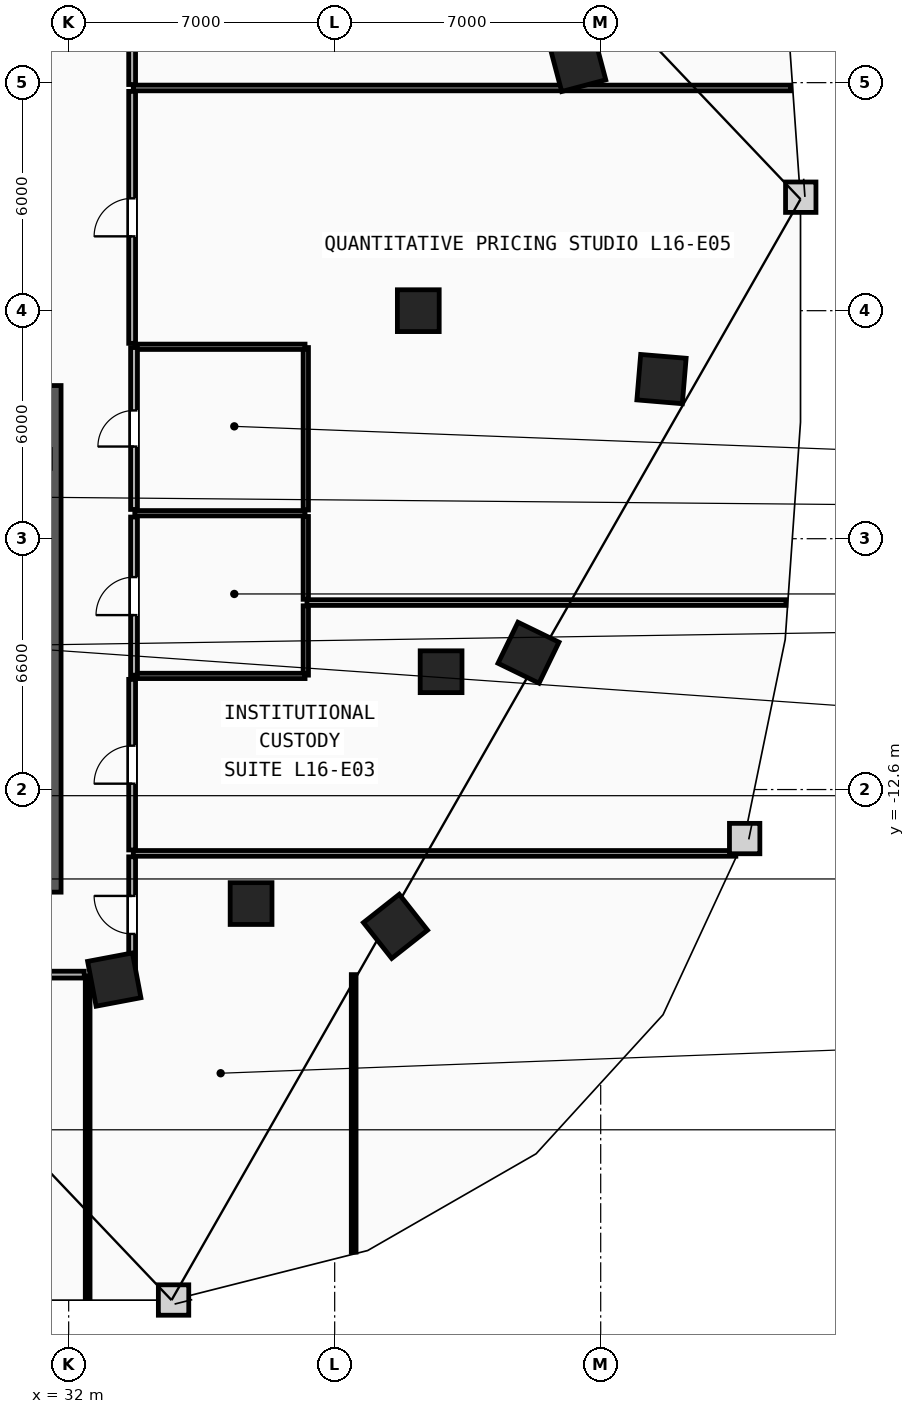
"""IFC4 building model, lengths in metres.
Left out: names, types, materials, properties, quantities, classifications, styles, units other than length and angle.
Written with IfcOpenShell. Run it as: python <this file> out.ifc"""

import sys

from ifc_helpers import new_model, si_unit, direction, frame, frame_2d, origin, origin_2d, place, context, subcontext, project, spatial, rectangle, extrude, element, fill, save


model = new_model("IFC4")
c1 = context("Model", 3, precision=1e-05, world=origin(), true_north=direction((0.0, 1.0)))
c2 = subcontext(c1, "Body", "Model", "MODEL_VIEW")
j1 = project(units=[si_unit("LENGTHUNIT", "METRE"), si_unit("PLANEANGLEUNIT", "RADIAN")], contexts=[c1])
p1 = place(None, origin())
s1 = spatial("IfcSite", under=j1, at=p1, CompositionType="ELEMENT")
p2 = place(p1, origin())
s2 = spatial("IfcBuilding", under=s1, at=p2, CompositionType="ELEMENT")
p3 = place(p2, frame((0.0, 0.0, 65.8)))
s3 = spatial("IfcBuildingStorey", under=s2, at=p3, CompositionType="ELEMENT", Elevation=65.8)
for number, where, z_axis, x_axis in (
    (1, (41.2, 0.0, 0.0), (0.0, 0.0, 1.0), (1.0, 0.0, 0.0)),
    (2, (41.8, -9.5, 0.0), (0.0, 0.0, 1.0), (1.0, 0.0, 0.0)),
    (3, (36.8, -15.6, 0.0), (0.0, 0.0, 1.0), (1.0, 0.0, 0.0)),
):
    element("IfcColumn", number, at=place(p3, frame(where, z_axis=z_axis, x_axis=x_axis)), inside=s3, PredefinedType="COLUMN", context=c2, shape_type="SweptSolid", body=[
        extrude(rectangle(XDim=1.1, YDim=1.1, at=origin_2d()), origin(), (0.0, 0.0, 1.0), 3.8),
    ])
for number, where, z_axis, x_axis in (
    (4, (33.2, -17.6, 0.0), (0.0, 0.0, 1.0), (0.983, 0.186, 0.0)),
    (5, (40.6, -16.2, 0.0), (0.0, 0.0, 1.0), (0.785, 0.619, 0.0)),
    (6, (44.1, -9.0, 0.0), (0.0, 0.0, 1.0), (0.437, 0.899, 0.0)),
    (7, (47.6, -1.8, 0.0), (0.0, 0.0, 1.0), (0.084, 0.997, 0.0)),
    (8, (45.4, 6.5, 0.0), (0.0, 0.0, 1.0), (-0.256, 0.967, 0.0)),
):
    element("IfcColumn", number, at=place(p3, frame(where, z_axis=z_axis, x_axis=x_axis)), inside=s3, PredefinedType="COLUMN", context=c2, shape_type="SweptSolid", body=[
        extrude(rectangle(XDim=1.2, YDim=1.2, at=origin_2d()), origin(), (0.0, 0.0, 1.0), 3.8),
    ])
p4 = place(p3, frame((31.35, -15.3, 0.0), z_axis=(0.0, 0.0, 1.0), x_axis=(0.0, 1.0, 0.0)))
e9 = element("IfcWall", 9, at=p4, inside=s3, PredefinedType="SHEAR", context=c2, shape_type="SweptSolid", body=[
    extrude(rectangle(XDim=13.33, YDim=0.9, at=frame_2d((6.665, 0.0))), origin(), (0.0, 0.0, 1.0), 3.5),
])
p5 = place(p3, frame((38.24, -9.59, 0.0), z_axis=(0.0, 0.0, 1.0), x_axis=(0.0, 1.0, 0.0)))
e10 = element("IfcWall", 10, at=p5, inside=s3, PredefinedType="PARTITIONING", context=c2, shape_type="SweptSolid", body=[
    extrude(rectangle(XDim=1.825, YDim=0.14, at=frame_2d((0.913, 0.0))), origin(), (0.0, 0.0, 1.0), 3.5),
])
p6 = place(p3, frame((38.24, -7.595, 0.0), z_axis=(0.0, 0.0, 1.0), x_axis=(0.0, 1.0, 0.0)))
e11 = element("IfcWall", 11, at=p6, inside=s3, PredefinedType="PARTITIONING", context=c2, shape_type="SweptSolid", body=[
    extrude(rectangle(XDim=2.18, YDim=0.14, at=frame_2d((1.09, 0.0))), origin(), (0.0, 0.0, 1.0), 3.5),
])
p7 = place(p3, frame((38.24, -5.245, 0.0), z_axis=(0.0, 0.0, 1.0), x_axis=(0.0, 1.0, 0.0)))
e12 = element("IfcWall", 12, at=p7, inside=s3, PredefinedType="PARTITIONING", context=c2, shape_type="SweptSolid", body=[
    extrude(rectangle(XDim=4.275, YDim=0.14, at=frame_2d((2.138, 0.0))), origin(), (0.0, 0.0, 1.0), 3.5),
])
for number, where, z_axis, x_axis in (
    (13, (33.74, -0.95, 0.0), (0.0, 0.0, 1.0), (1.0, 0.0, 0.0)),
    (14, (33.74, -5.33, 0.0), (0.0, 0.0, 1.0), (1.0, 0.0, 0.0)),
    (15, (33.74, -9.61, 0.0), (0.0, 0.0, 1.0), (1.0, 0.0, 0.0)),
):
    element("IfcWall", number, at=place(p3, frame(where, z_axis=z_axis, x_axis=x_axis)), inside=s3, PredefinedType="PARTITIONING", context=c2, shape_type="SweptSolid", body=[
        extrude(rectangle(XDim=4.48, YDim=0.14, at=frame_2d((2.24, 0.0))), origin(), (0.0, 0.0, 1.0), 3.5),
    ])
p8 = place(p3, frame((33.72, -5.23, 0.0), z_axis=(0.0, 0.0, 1.0), x_axis=(0.0, 1.0, 0.0)))
e16 = element("IfcWall", 16, at=p8, inside=s3, PredefinedType="PARTITIONING", context=c2, shape_type="SweptSolid", body=[
    extrude(rectangle(XDim=4.26, YDim=0.18, at=frame_2d((2.13, 0.0))), origin(), (0.0, 0.0, 1.0), 3.5),
])
p9 = place(p8, frame((1.655, 0.0, 0.0)))
e17 = element("IfcOpeningElement", 17, at=p9, cuts=e16, PredefinedType="OPENING", context=c2, shape_type="SweptSolid", body=[
    extrude(rectangle(XDim=0.95, YDim=2.1, at=frame_2d((0.475, 1.05))), frame((0.0, 0.1, 0.0), z_axis=(0.0, -1.0, 0.0), x_axis=(1.0, 0.0, 0.0)), (0.0, 0.0, 1.0), 0.2),
])
p10 = place(p3, frame((33.72, -9.59, 0.0), z_axis=(0.0, 0.0, 1.0), x_axis=(0.0, 1.0, 0.0)))
e18 = element("IfcWall", 18, at=p10, inside=s3, PredefinedType="PARTITIONING", context=c2, shape_type="SweptSolid", body=[
    extrude(rectangle(XDim=4.16, YDim=0.18, at=frame_2d((2.08, 0.0))), origin(), (0.0, 0.0, 1.0), 3.5),
])
p11 = place(p10, frame((1.58, 0.0, 0.0)))
e19 = element("IfcOpeningElement", 19, at=p11, cuts=e18, PredefinedType="OPENING", context=c2, shape_type="SweptSolid", body=[
    extrude(rectangle(XDim=1.0, YDim=2.15, at=frame_2d((0.5, 1.075))), frame((0.0, 0.1, 0.0), z_axis=(0.0, -1.0, 0.0), x_axis=(1.0, 0.0, 0.0)), (0.0, 0.0, 1.0), 0.2),
])
p12 = place(p3, frame((33.7, 5.86, 0.0), z_axis=(0.0, 0.0, 1.0), x_axis=(1.0, 0.0, 0.0)))
e20 = element("IfcWall", 20, at=p12, inside=s3, PredefinedType="PARTITIONING", context=c2, shape_type="SweptSolid", body=[
    extrude(rectangle(XDim=17.302, YDim=0.15, at=frame_2d((8.651, 0.0))), origin(), (0.0, 0.0, 1.0), 3.5),
])
p13 = place(p3, frame((38.27, -7.68, 0.0), z_axis=(0.0, 0.0, 1.0), x_axis=(1.0, 0.0, 0.0)))
e21 = element("IfcWall", 21, at=p13, inside=s3, PredefinedType="PARTITIONING", context=c2, shape_type="SweptSolid", body=[
    extrude(rectangle(XDim=12.604, YDim=0.15, at=frame_2d((6.302, 0.0))), origin(), (0.0, 0.0, 1.0), 3.5),
])
p14 = place(p3, frame((33.7, -14.28, 0.0), z_axis=(0.0, 0.0, 1.0), x_axis=(1.0, 0.0, 0.0)))
e22 = element("IfcWall", 22, at=p14, inside=s3, PredefinedType="PARTITIONING", context=c2, shape_type="SweptSolid", body=[
    extrude(rectangle(XDim=15.857, YDim=0.15, at=frame_2d((7.928, 0.0))), origin(), (0.0, 0.0, 1.0), 3.5),
])
p15 = place(p3, frame((32.5, -25.985, 0.0), z_axis=(0.0, 0.0, 1.0), x_axis=(0.0, 1.0, 0.0)))
e23 = element("IfcWall", 23, at=p15, inside=s3, PredefinedType="PARTITIONING", context=c2, shape_type="SweptSolid", body=[
    extrude(rectangle(XDim=8.485, YDim=0.125, at=frame_2d((4.243, 0.0))), origin(), (0.0, 0.0, 1.0), 3.5),
])
p16 = place(p3, frame((39.5, -24.772, 0.0), z_axis=(0.0, 0.0, 1.0), x_axis=(0.0, 1.0, 0.0)))
e24 = element("IfcWall", 24, at=p16, inside=s3, PredefinedType="PARTITIONING", context=c2, shape_type="SweptSolid", body=[
    extrude(rectangle(XDim=7.302, YDim=0.125, at=frame_2d((3.651, 0.0))), origin(), (0.0, 0.0, 1.0), 3.5),
])
p17 = place(p3, frame((24.59, -17.47, 0.0), z_axis=(0.0, 0.0, 1.0), x_axis=(1.0, 0.0, 0.0)))
e25 = element("IfcWall", 25, at=p17, inside=s3, PredefinedType="PARTITIONING", context=c2, shape_type="SweptSolid", body=[
    extrude(rectangle(XDim=7.82, YDim=0.18, at=frame_2d((3.91, 0.0))), origin(), (0.0, 0.0, 1.0), 3.5),
])
p18 = place(p17, frame((3.41, 0.0, 0.0)))
e26 = element("IfcOpeningElement", 26, at=p18, cuts=e25, PredefinedType="OPENING", context=c2, shape_type="SweptSolid", body=[
    extrude(rectangle(XDim=1.0, YDim=2.15, at=frame_2d((0.5, 1.075))), frame((0.0, 0.1, 0.0), z_axis=(0.0, -1.0, 0.0), x_axis=(1.0, 0.0, 0.0)), (0.0, 0.0, 1.0), 0.2),
])
p19 = place(p3, frame((33.67, -17.428, 0.0), z_axis=(0.0, 0.0, 1.0), x_axis=(0.0, 1.0, 0.0)))
e27 = element("IfcWall", 27, at=p19, inside=s3, PredefinedType="PARTITIONING", context=c2, shape_type="SweptSolid", body=[
    extrude(rectangle(XDim=3.058, YDim=0.18, at=frame_2d((1.529, 0.0))), origin(), (0.0, 0.0, 1.0), 3.5),
])
p20 = place(p19, frame((1.029, 0.0, 0.0)))
e28 = element("IfcOpeningElement", 28, at=p20, cuts=e27, PredefinedType="OPENING", context=c2, shape_type="SweptSolid", body=[
    extrude(rectangle(XDim=1.0, YDim=2.15, at=frame_2d((0.5, 1.075))), frame((0.0, 0.1, 0.0), z_axis=(0.0, -1.0, 0.0), x_axis=(1.0, 0.0, 0.0)), (0.0, 0.0, 1.0), 0.2),
])
p21 = place(p3, frame((32.59, -17.47, 0.0), z_axis=(0.0, 0.0, 1.0), x_axis=(1.0, 0.0, 0.0)))
e29 = element("IfcWall", 29, at=p21, inside=s3, PredefinedType="PARTITIONING", context=c2, shape_type="SweptSolid", body=[
    extrude(rectangle(XDim=1.038, YDim=0.18, at=frame_2d((0.519, 0.0))), origin(), (0.0, 0.0, 1.0), 3.5),
])
p22 = place(p3, frame((33.67, -14.19, 0.0), z_axis=(0.0, 0.0, 1.0), x_axis=(0.0, 1.0, 0.0)))
e30 = element("IfcWall", 30, at=p22, inside=s3, PredefinedType="PARTITIONING", context=c2, shape_type="SweptSolid", body=[
    extrude(rectangle(XDim=4.489, YDim=0.18, at=frame_2d((2.244, 0.0))), origin(), (0.0, 0.0, 1.0), 3.5),
])
p23 = place(p22, frame((1.744, 0.0, 0.0)))
e31 = element("IfcOpeningElement", 31, at=p23, cuts=e30, PredefinedType="OPENING", context=c2, shape_type="SweptSolid", body=[
    extrude(rectangle(XDim=1.0, YDim=2.15, at=frame_2d((0.5, 1.075))), frame((0.0, 0.1, 0.0), z_axis=(0.0, -1.0, 0.0), x_axis=(1.0, 0.0, 0.0)), (0.0, 0.0, 1.0), 0.2),
])
p24 = place(p3, frame((33.67, -0.859, 0.0), z_axis=(0.0, 0.0, 1.0), x_axis=(0.0, 1.0, 0.0)))
e32 = element("IfcWall", 32, at=p24, inside=s3, PredefinedType="PARTITIONING", context=c2, shape_type="SweptSolid", body=[
    extrude(rectangle(XDim=6.629, YDim=0.18, at=frame_2d((3.314, 0.0))), origin(), (0.0, 0.0, 1.0), 3.5),
])
p25 = place(p24, frame((2.814, 0.0, 0.0)))
e33 = element("IfcOpeningElement", 33, at=p25, cuts=e32, PredefinedType="OPENING", context=c2, shape_type="SweptSolid", body=[
    extrude(rectangle(XDim=1.0, YDim=2.15, at=frame_2d((0.5, 1.075))), frame((0.0, 0.1, 0.0), z_axis=(0.0, -1.0, 0.0), x_axis=(1.0, 0.0, 0.0)), (0.0, 0.0, 1.0), 0.2),
])
p26 = place(p3, frame((33.67, 5.95, 0.0), z_axis=(0.0, 0.0, 1.0), x_axis=(0.0, 1.0, 0.0)))
e34 = element("IfcWall", 34, at=p26, inside=s3, PredefinedType="PARTITIONING", context=c2, shape_type="SweptSolid", body=[
    extrude(rectangle(XDim=5.45, YDim=0.18, at=frame_2d((2.725, 0.0))), origin(), (0.0, 0.0, 1.0), 3.5),
])
p27 = place(p25, origin())
e35 = element("IfcDoor", 35, at=p27, inside=s3, OperationType="SINGLE_SWING_LEFT", PredefinedType="DOOR", context=c2, shape_type="SweptSolid", body=[
    extrude(rectangle(XDim=1.0, YDim=2.15, at=frame_2d((0.5, 1.075))), frame((0.0, 0.025, 0.0), z_axis=(0.0, -1.0, 0.0), x_axis=(1.0, 0.0, 0.0)), (0.0, 0.0, 1.0), 0.05),
])
fill(e33, e35)
p28 = place(p23, origin())
e36 = element("IfcDoor", 36, at=p28, inside=s3, OperationType="SINGLE_SWING_LEFT", PredefinedType="DOOR", context=c2, shape_type="SweptSolid", body=[
    extrude(rectangle(XDim=1.0, YDim=2.15, at=frame_2d((0.5, 1.075))), frame((0.0, 0.025, 0.0), z_axis=(0.0, -1.0, 0.0), x_axis=(1.0, 0.0, 0.0)), (0.0, 0.0, 1.0), 0.05),
])
fill(e31, e36)
p29 = place(p9, origin())
e37 = element("IfcDoor", 37, at=p29, inside=s3, OperationType="SINGLE_SWING_LEFT", PredefinedType="DOOR", context=c2, shape_type="SweptSolid", body=[
    extrude(rectangle(XDim=0.95, YDim=2.1, at=frame_2d((0.475, 1.05))), frame((0.0, 0.025, 0.0), z_axis=(0.0, -1.0, 0.0), x_axis=(1.0, 0.0, 0.0)), (0.0, 0.0, 1.0), 0.05),
])
fill(e17, e37)
p30 = place(p11, origin())
e38 = element("IfcDoor", 38, at=p30, inside=s3, OperationType="SINGLE_SWING_LEFT", PredefinedType="DOOR", context=c2, shape_type="SweptSolid", body=[
    extrude(rectangle(XDim=1.0, YDim=2.15, at=frame_2d((0.5, 1.075))), frame((0.0, 0.025, 0.0), z_axis=(0.0, -1.0, 0.0), x_axis=(1.0, 0.0, 0.0)), (0.0, 0.0, 1.0), 0.05),
])
fill(e19, e38)
p31 = place(p20, origin())
e39 = element("IfcDoor", 39, at=p31, inside=s3, OperationType="SINGLE_SWING_RIGHT", PredefinedType="DOOR", context=c2, shape_type="SweptSolid", body=[
    extrude(rectangle(XDim=1.0, YDim=2.15, at=frame_2d((0.5, 1.075))), frame((0.0, 0.025, 0.0), z_axis=(0.0, -1.0, 0.0), x_axis=(1.0, 0.0, 0.0)), (0.0, 0.0, 1.0), 0.05),
])
fill(e28, e39)
save(model, sys.argv[1])
